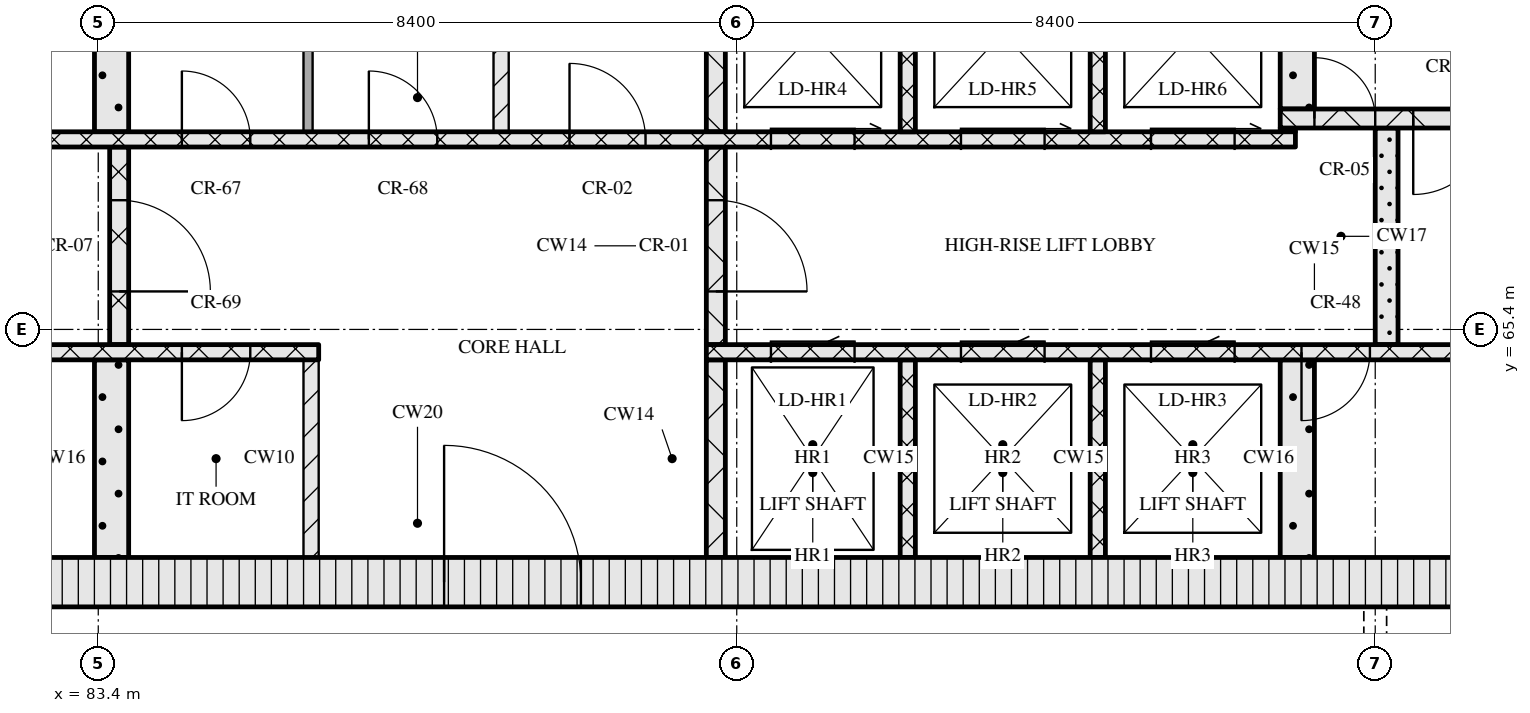
"""IFC4 building model, lengths in metres.
Left out: names, types, materials, properties, quantities, classifications, styles, units other than length and angle.
Written with IfcOpenShell. Run it as: python <this file> out.ifc"""

import sys

from ifc_helpers import new_model, si_unit, direction, frame, frame_2d, origin, place, context, subcontext, project, spatial, rectangle, extrude, element, fill, save


model = new_model("IFC4")
c1 = context("Model", 3, precision=1e-05, world=origin(), true_north=direction((0.0, 1.0)))
c2 = subcontext(c1, "Body", "Model", "MODEL_VIEW")
j1 = project(units=[si_unit("LENGTHUNIT", "METRE"), si_unit("PLANEANGLEUNIT", "RADIAN")], contexts=[c1])
p1 = place(None, origin())
s1 = spatial("IfcSite", under=j1, at=p1, CompositionType="ELEMENT")
p2 = place(p1, origin())
s2 = spatial("IfcBuilding", under=s1, at=p2, CompositionType="ELEMENT")
p3 = place(p2, frame((0.0, 0.0, 209.1)))
s3 = spatial("IfcBuildingStorey", under=s2, at=p3, CompositionType="ELEMENT", Elevation=209.1)
p4 = place(p3, frame((67.15, 62.075, 0.0), z_axis=(0.0, 0.0, 1.0), x_axis=(1.0, 0.0, 0.0)))
e1 = element("IfcWall", 1, at=p4, inside=s3, PredefinedType="SOLIDWALL", context=c2, shape_type="SweptSolid", body=[
    extrude(rectangle(XDim=40.9, YDim=0.65, at=frame_2d((20.45, 0.0))), origin(), (0.0, 0.0, 1.0), 3.32),
])
p5 = place(p4, frame((20.8, 0.0, 0.0)))
e2 = element("IfcOpeningElement", 2, at=p5, cuts=e1, PredefinedType="OPENING", context=c2, shape_type="SweptSolid", body=[
    extrude(rectangle(XDim=1.8, YDim=2.1, at=frame_2d((0.9, 1.05))), frame((0.0, 0.335, 0.0), z_axis=(0.0, -1.0, 0.0), x_axis=(1.0, 0.0, 0.0)), (0.0, 0.0, 1.0), 0.67),
])
p6 = place(p3, frame((83.575, 62.4, 0.0), z_axis=(0.0, 0.0, 1.0), x_axis=(0.0, 1.0, 0.0)))
e3 = element("IfcWall", 3, at=p6, inside=s3, PredefinedType="SOLIDWALL", context=c2, shape_type="SweptSolid", body=[
    extrude(rectangle(XDim=2.6, YDim=0.45, at=frame_2d((1.3, 0.0))), origin(), (0.0, 0.0, 1.0), 3.32),
])
p7 = place(p3, frame((86.2, 62.4, 0.0), z_axis=(0.0, 0.0, 1.0), x_axis=(0.0, 1.0, 0.0)))
e4 = element("IfcWall", 4, at=p7, inside=s3, PredefinedType="PARTITIONING", context=c2, shape_type="SweptSolid", body=[
    extrude(rectangle(XDim=2.6, YDim=0.2, at=frame_2d((1.3, 0.0))), origin(), (0.0, 0.0, 1.0), 3.32),
])
p8 = place(p3, frame((91.525, 62.4, 0.0), z_axis=(0.0, 0.0, 1.0), x_axis=(0.0, 1.0, 0.0)))
e5 = element("IfcWall", 5, at=p8, inside=s3, PredefinedType="SOLIDWALL", context=c2, shape_type="SweptSolid", body=[
    extrude(rectangle(XDim=2.6, YDim=0.25, at=frame_2d((1.3, 0.0))), origin(), (0.0, 0.0, 1.0), 3.32),
])
for number, where, z_axis, x_axis in (
    (6, (94.05, 62.4, 0.0), (0.0, 0.0, 1.0), (0.0, 1.0, 0.0)),
    (7, (96.55, 62.4, 0.0), (0.0, 0.0, 1.0), (0.0, 1.0, 0.0)),
):
    element("IfcWall", number, at=place(p3, frame(where, z_axis=z_axis, x_axis=x_axis)), inside=s3, PredefinedType="SOLIDWALL", context=c2, shape_type="SweptSolid", body=[
        extrude(rectangle(XDim=2.6, YDim=0.2, at=frame_2d((1.3, 0.0))), origin(), (0.0, 0.0, 1.0), 3.32),
    ])
p9 = place(p3, frame((99.175, 62.4, 0.0), z_axis=(0.0, 0.0, 1.0), x_axis=(0.0, 1.0, 0.0)))
e8 = element("IfcWall", 8, at=p9, inside=s3, PredefinedType="SOLIDWALL", context=c2, shape_type="SweptSolid", body=[
    extrude(rectangle(XDim=2.6, YDim=0.45, at=frame_2d((1.3, 0.0))), origin(), (0.0, 0.0, 1.0), 3.32),
])
p10 = place(p3, frame((67.8, 65.1, 0.0), z_axis=(0.0, 0.0, 1.0), x_axis=(1.0, 0.0, 0.0)))
e9 = element("IfcWall", 9, at=p10, inside=s3, PredefinedType="SOLIDWALL", context=c2, shape_type="SweptSolid", body=[
    extrude(rectangle(XDim=18.5, YDim=0.2, at=frame_2d((9.25, 0.0))), origin(), (0.0, 0.0, 1.0), 3.32),
])
p11 = place(p10, frame((7.27, 0.0, 0.0)))
e10 = element("IfcOpeningElement", 10, at=p11, cuts=e9, PredefinedType="OPENING", context=c2, shape_type="SweptSolid", body=[
    extrude(rectangle(XDim=0.9, YDim=2.1, at=frame_2d((0.45, 1.05))), frame((0.0, 0.11, 0.0), z_axis=(0.0, -1.0, 0.0), x_axis=(1.0, 0.0, 0.0)), (0.0, 0.0, 1.0), 0.22),
])
p12 = place(p10, frame((11.45, 0.0, 0.0)))
e11 = element("IfcOpeningElement", 11, at=p12, cuts=e9, PredefinedType="OPENING", context=c2, shape_type="SweptSolid", body=[
    extrude(rectangle(XDim=0.9, YDim=2.1, at=frame_2d((0.45, 1.05))), frame((0.0, 0.11, 0.0), z_axis=(0.0, -1.0, 0.0), x_axis=(1.0, 0.0, 0.0)), (0.0, 0.0, 1.0), 0.22),
])
p13 = place(p10, frame((16.7, 0.0, 0.0)))
e12 = element("IfcOpeningElement", 12, at=p13, cuts=e9, PredefinedType="OPENING", context=c2, shape_type="SweptSolid", body=[
    extrude(rectangle(XDim=0.9, YDim=2.1, at=frame_2d((0.45, 1.05))), frame((0.0, 0.11, 0.0), z_axis=(0.0, -1.0, 0.0), x_axis=(1.0, 0.0, 0.0)), (0.0, 0.0, 1.0), 0.22),
])
p14 = place(p3, frame((91.4, 65.1, 0.0), z_axis=(0.0, 0.0, 1.0), x_axis=(1.0, 0.0, 0.0)))
e13 = element("IfcWall", 13, at=p14, inside=s3, PredefinedType="SOLIDWALL", context=c2, shape_type="SweptSolid", body=[
    extrude(rectangle(XDim=16.0, YDim=0.2, at=frame_2d((8.0, 0.0))), origin(), (0.0, 0.0, 1.0), 3.32),
])
p15 = place(p14, frame((0.85, 0.0, 0.0)))
e14 = element("IfcOpeningElement", 14, at=p15, cuts=e13, PredefinedType="OPENING", context=c2, shape_type="SweptSolid", body=[
    extrude(rectangle(XDim=1.1, YDim=2.1, at=frame_2d((0.55, 1.05))), frame((0.0, 0.11, 0.0), z_axis=(0.0, -1.0, 0.0), x_axis=(1.0, 0.0, 0.0)), (0.0, 0.0, 1.0), 0.22),
])
p16 = place(p14, frame((3.35, 0.0, 0.0)))
e15 = element("IfcOpeningElement", 15, at=p16, cuts=e13, PredefinedType="OPENING", context=c2, shape_type="SweptSolid", body=[
    extrude(rectangle(XDim=1.1, YDim=2.1, at=frame_2d((0.55, 1.05))), frame((0.0, 0.11, 0.0), z_axis=(0.0, -1.0, 0.0), x_axis=(1.0, 0.0, 0.0)), (0.0, 0.0, 1.0), 0.22),
])
p17 = place(p14, frame((5.85, 0.0, 0.0)))
e16 = element("IfcOpeningElement", 16, at=p17, cuts=e13, PredefinedType="OPENING", context=c2, shape_type="SweptSolid", body=[
    extrude(rectangle(XDim=1.1, YDim=2.1, at=frame_2d((0.55, 1.05))), frame((0.0, 0.11, 0.0), z_axis=(0.0, -1.0, 0.0), x_axis=(1.0, 0.0, 0.0)), (0.0, 0.0, 1.0), 0.22),
])
p18 = place(p14, frame((7.83, 0.0, 0.0)))
e17 = element("IfcOpeningElement", 17, at=p18, cuts=e13, PredefinedType="OPENING", context=c2, shape_type="SweptSolid", body=[
    extrude(rectangle(XDim=0.9, YDim=2.1, at=frame_2d((0.45, 1.05))), frame((0.0, 0.11, 0.0), z_axis=(0.0, -1.0, 0.0), x_axis=(1.0, 0.0, 0.0)), (0.0, 0.0, 1.0), 0.22),
])
p19 = place(p3, frame((83.675, 65.2, 0.0), z_axis=(0.0, 0.0, 1.0), x_axis=(0.0, 1.0, 0.0)))
e18 = element("IfcWall", 18, at=p19, inside=s3, PredefinedType="SOLIDWALL", context=c2, shape_type="SweptSolid", body=[
    extrude(rectangle(XDim=2.6, YDim=0.25, at=frame_2d((1.3, 0.0))), origin(), (0.0, 0.0, 1.0), 3.32),
])
p20 = place(p19, frame((0.7, 0.0, 0.0)))
e19 = element("IfcOpeningElement", 19, at=p20, cuts=e18, PredefinedType="OPENING", context=c2, shape_type="SweptSolid", body=[
    extrude(rectangle(XDim=1.2, YDim=2.1, at=frame_2d((0.6, 1.05))), frame((0.0, 0.135, 0.0), z_axis=(0.0, -1.0, 0.0), x_axis=(1.0, 0.0, 0.0)), (0.0, 0.0, 1.0), 0.27),
])
p21 = place(p3, frame((91.525, 65.2, 0.0), z_axis=(0.0, 0.0, 1.0), x_axis=(0.0, 1.0, 0.0)))
e20 = element("IfcWall", 20, at=p21, inside=s3, PredefinedType="SOLIDWALL", context=c2, shape_type="SweptSolid", body=[
    extrude(rectangle(XDim=2.6, YDim=0.25, at=frame_2d((1.3, 0.0))), origin(), (0.0, 0.0, 1.0), 3.32),
])
p22 = place(p21, frame((0.7, 0.0, 0.0)))
e21 = element("IfcOpeningElement", 21, at=p22, cuts=e20, PredefinedType="OPENING", context=c2, shape_type="SweptSolid", body=[
    extrude(rectangle(XDim=1.2, YDim=2.1, at=frame_2d((0.6, 1.05))), frame((0.0, 0.135, 0.0), z_axis=(0.0, -1.0, 0.0), x_axis=(1.0, 0.0, 0.0)), (0.0, 0.0, 1.0), 0.27),
])
p23 = place(p3, frame((100.35, 65.2, 0.0), z_axis=(0.0, 0.0, 1.0), x_axis=(0.0, 1.0, 0.0)))
e22 = element("IfcWall", 22, at=p23, inside=s3, PredefinedType="SOLIDWALL", context=c2, shape_type="SweptSolid", body=[
    extrude(rectangle(XDim=2.85, YDim=0.3, at=frame_2d((1.425, 0.0))), origin(), (0.0, 0.0, 1.0), 3.32),
])
p24 = place(p3, frame((76.05, 67.9, 0.0), z_axis=(0.0, 0.0, 1.0), x_axis=(1.0, 0.0, 0.0)))
e23 = element("IfcWall", 23, at=p24, inside=s3, PredefinedType="SOLIDWALL", context=c2, shape_type="SweptSolid", body=[
    extrude(rectangle(XDim=23.1, YDim=0.2, at=frame_2d((11.55, 0.0))), origin(), (0.0, 0.0, 1.0), 3.32),
])
p25 = place(p24, frame((1.4, 0.0, 0.0)))
e24 = element("IfcOpeningElement", 24, at=p25, cuts=e23, PredefinedType="OPENING", context=c2, shape_type="SweptSolid", body=[
    extrude(rectangle(XDim=0.9, YDim=2.1, at=frame_2d((0.45, 1.05))), frame((0.0, 0.11, 0.0), z_axis=(0.0, -1.0, 0.0), x_axis=(1.0, 0.0, 0.0)), (0.0, 0.0, 1.0), 0.22),
])
p26 = place(p24, frame((5.11, 0.0, 0.0)))
e25 = element("IfcOpeningElement", 25, at=p26, cuts=e23, PredefinedType="OPENING", context=c2, shape_type="SweptSolid", body=[
    extrude(rectangle(XDim=0.9, YDim=2.1, at=frame_2d((0.45, 1.05))), frame((0.0, 0.11, 0.0), z_axis=(0.0, -1.0, 0.0), x_axis=(1.0, 0.0, 0.0)), (0.0, 0.0, 1.0), 0.22),
])
p27 = place(p24, frame((8.45, 0.0, 0.0)))
e26 = element("IfcOpeningElement", 26, at=p27, cuts=e23, PredefinedType="OPENING", context=c2, shape_type="SweptSolid", body=[
    extrude(rectangle(XDim=0.9, YDim=2.1, at=frame_2d((0.45, 1.05))), frame((0.0, 0.11, 0.0), z_axis=(0.0, -1.0, 0.0), x_axis=(1.0, 0.0, 0.0)), (0.0, 0.0, 1.0), 0.22),
])
p28 = place(p24, frame((10.91, 0.0, 0.0)))
e27 = element("IfcOpeningElement", 27, at=p28, cuts=e23, PredefinedType="OPENING", context=c2, shape_type="SweptSolid", body=[
    extrude(rectangle(XDim=0.9, YDim=2.1, at=frame_2d((0.45, 1.05))), frame((0.0, 0.11, 0.0), z_axis=(0.0, -1.0, 0.0), x_axis=(1.0, 0.0, 0.0)), (0.0, 0.0, 1.0), 0.22),
])
p29 = place(p24, frame((13.55, 0.0, 0.0)))
e28 = element("IfcOpeningElement", 28, at=p29, cuts=e23, PredefinedType="OPENING", context=c2, shape_type="SweptSolid", body=[
    extrude(rectangle(XDim=1.0, YDim=2.1, at=frame_2d((0.5, 1.05))), frame((0.0, 0.11, 0.0), z_axis=(0.0, -1.0, 0.0), x_axis=(1.0, 0.0, 0.0)), (0.0, 0.0, 1.0), 0.22),
])
p30 = place(p24, frame((16.2, 0.0, 0.0)))
e29 = element("IfcOpeningElement", 29, at=p30, cuts=e23, PredefinedType="OPENING", context=c2, shape_type="SweptSolid", body=[
    extrude(rectangle(XDim=1.1, YDim=2.1, at=frame_2d((0.55, 1.05))), frame((0.0, 0.11, 0.0), z_axis=(0.0, -1.0, 0.0), x_axis=(1.0, 0.0, 0.0)), (0.0, 0.0, 1.0), 0.22),
])
p31 = place(p24, frame((18.7, 0.0, 0.0)))
e30 = element("IfcOpeningElement", 30, at=p31, cuts=e23, PredefinedType="OPENING", context=c2, shape_type="SweptSolid", body=[
    extrude(rectangle(XDim=1.1, YDim=2.1, at=frame_2d((0.55, 1.05))), frame((0.0, 0.11, 0.0), z_axis=(0.0, -1.0, 0.0), x_axis=(1.0, 0.0, 0.0)), (0.0, 0.0, 1.0), 0.22),
])
p32 = place(p24, frame((21.2, 0.0, 0.0)))
e31 = element("IfcOpeningElement", 31, at=p32, cuts=e23, PredefinedType="OPENING", context=c2, shape_type="SweptSolid", body=[
    extrude(rectangle(XDim=1.1, YDim=2.1, at=frame_2d((0.55, 1.05))), frame((0.0, 0.11, 0.0), z_axis=(0.0, -1.0, 0.0), x_axis=(1.0, 0.0, 0.0)), (0.0, 0.0, 1.0), 0.22),
])
p33 = place(p3, frame((83.575, 68.0, 0.0), z_axis=(0.0, 0.0, 1.0), x_axis=(0.0, 1.0, 0.0)))
e32 = element("IfcWall", 32, at=p33, inside=s3, PredefinedType="SOLIDWALL", context=c2, shape_type="SweptSolid", body=[
    extrude(rectangle(XDim=2.6, YDim=0.45, at=frame_2d((1.3, 0.0))), origin(), (0.0, 0.0, 1.0), 3.32),
])
p34 = place(p3, frame((86.16, 68.0, 0.0), z_axis=(0.0, 0.0, 1.0), x_axis=(0.0, 1.0, 0.0)))
e33 = element("IfcWall", 33, at=p34, inside=s3, PredefinedType="PARTITIONING", context=c2, shape_type="SweptSolid", body=[
    extrude(rectangle(XDim=2.6, YDim=0.12, at=frame_2d((1.3, 0.0))), origin(), (0.0, 0.0, 1.0), 3.32),
])
p35 = place(p3, frame((88.7, 68.0, 0.0), z_axis=(0.0, 0.0, 1.0), x_axis=(0.0, 1.0, 0.0)))
e34 = element("IfcWall", 34, at=p35, inside=s3, PredefinedType="PARTITIONING", context=c2, shape_type="SweptSolid", body=[
    extrude(rectangle(XDim=2.6, YDim=0.2, at=frame_2d((1.3, 0.0))), origin(), (0.0, 0.0, 1.0), 3.32),
])
p36 = place(p3, frame((91.525, 68.0, 0.0), z_axis=(0.0, 0.0, 1.0), x_axis=(0.0, 1.0, 0.0)))
e35 = element("IfcWall", 35, at=p36, inside=s3, PredefinedType="SOLIDWALL", context=c2, shape_type="SweptSolid", body=[
    extrude(rectangle(XDim=2.6, YDim=0.25, at=frame_2d((1.3, 0.0))), origin(), (0.0, 0.0, 1.0), 3.32),
])
for number, where, z_axis, x_axis in (
    (36, (94.05, 68.0, 0.0), (0.0, 0.0, 1.0), (0.0, 1.0, 0.0)),
    (37, (96.55, 68.0, 0.0), (0.0, 0.0, 1.0), (0.0, 1.0, 0.0)),
):
    element("IfcWall", number, at=place(p3, frame(where, z_axis=z_axis, x_axis=x_axis)), inside=s3, PredefinedType="SOLIDWALL", context=c2, shape_type="SweptSolid", body=[
        extrude(rectangle(XDim=2.6, YDim=0.2, at=frame_2d((1.3, 0.0))), origin(), (0.0, 0.0, 1.0), 3.32),
    ])
p37 = place(p3, frame((98.95, 68.025, 0.0), z_axis=(0.0, 0.0, 1.0), x_axis=(1.0, 0.0, 0.0)))
e38 = element("IfcWall", 38, at=p37, inside=s3, PredefinedType="SOLIDWALL", context=c2, shape_type="SweptSolid", body=[
    extrude(rectangle(XDim=0.2, YDim=0.05, at=frame_2d((0.1, 0.0))), origin(), (0.0, 0.0, 1.0), 3.32),
])
p38 = place(p3, frame((98.95, 68.175, 0.0), z_axis=(0.0, 0.0, 1.0), x_axis=(1.0, 0.0, 0.0)))
e39 = element("IfcWall", 39, at=p38, inside=s3, PredefinedType="SOLIDWALL", context=c2, shape_type="SweptSolid", body=[
    extrude(rectangle(XDim=8.45, YDim=0.25, at=frame_2d((4.225, 0.0))), origin(), (0.0, 0.0, 1.0), 3.32),
])
p39 = place(p38, frame((0.45, 0.0, 0.0)))
e40 = element("IfcOpeningElement", 40, at=p39, cuts=e39, PredefinedType="OPENING", context=c2, shape_type="SweptSolid", body=[
    extrude(rectangle(XDim=0.8, YDim=2.1, at=frame_2d((0.4, 1.05))), frame((0.0, 0.135, 0.0), z_axis=(0.0, -1.0, 0.0), x_axis=(1.0, 0.0, 0.0)), (0.0, 0.0, 1.0), 0.27),
])
p40 = place(p38, frame((1.75, 0.0, 0.0)))
e41 = element("IfcOpeningElement", 41, at=p40, cuts=e39, PredefinedType="OPENING", context=c2, shape_type="SweptSolid", body=[
    extrude(rectangle(XDim=1.0, YDim=2.1, at=frame_2d((0.5, 1.05))), frame((0.0, 0.135, 0.0), z_axis=(0.0, -1.0, 0.0), x_axis=(1.0, 0.0, 0.0)), (0.0, 0.0, 1.0), 0.27),
])
p41 = place(p3, frame((99.175, 68.3, 0.0), z_axis=(0.0, 0.0, 1.0), x_axis=(0.0, 1.0, 0.0)))
e42 = element("IfcWall", 42, at=p41, inside=s3, PredefinedType="SOLIDWALL", context=c2, shape_type="SweptSolid", body=[
    extrude(rectangle(XDim=2.3, YDim=0.45, at=frame_2d((1.15, 0.0))), origin(), (0.0, 0.0, 1.0), 3.32),
])
p42 = place(p5, origin())
e43 = element("IfcDoor", 43, at=p42, inside=s3, OperationType="DOUBLE_DOOR_SINGLE_SWING", PredefinedType="DOOR", context=c2, shape_type="SweptSolid", body=[
    extrude(rectangle(XDim=1.8, YDim=2.1, at=frame_2d((0.9, 1.05))), frame((0.0, 0.025, 0.0), z_axis=(0.0, -1.0, 0.0), x_axis=(1.0, 0.0, 0.0)), (0.0, 0.0, 1.0), 0.05),
])
fill(e2, e43)
p43 = place(p13, origin())
e44 = element("IfcDoor", 44, at=p43, inside=s3, OperationType="SINGLE_SWING_RIGHT", PredefinedType="DOOR", context=c2, shape_type="SweptSolid", body=[
    extrude(rectangle(XDim=0.9, YDim=2.1, at=frame_2d((0.45, 1.05))), frame((0.0, 0.025, 0.0), z_axis=(0.0, -1.0, 0.0), x_axis=(1.0, 0.0, 0.0)), (0.0, 0.0, 1.0), 0.05),
])
fill(e12, e44)
p44 = place(p15, origin())
e45 = element("IfcDoor", 45, at=p44, inside=s3, OperationType="SLIDING_TO_LEFT", PredefinedType="DOOR", context=c2, shape_type="SweptSolid", body=[
    extrude(rectangle(XDim=1.1, YDim=2.1, at=frame_2d((0.55, 1.05))), frame((0.0, 0.025, 0.0), z_axis=(0.0, -1.0, 0.0), x_axis=(1.0, 0.0, 0.0)), (0.0, 0.0, 1.0), 0.05),
])
fill(e14, e45)
p45 = place(p16, origin())
e46 = element("IfcDoor", 46, at=p45, inside=s3, OperationType="SLIDING_TO_LEFT", PredefinedType="DOOR", context=c2, shape_type="SweptSolid", body=[
    extrude(rectangle(XDim=1.1, YDim=2.1, at=frame_2d((0.55, 1.05))), frame((0.0, 0.025, 0.0), z_axis=(0.0, -1.0, 0.0), x_axis=(1.0, 0.0, 0.0)), (0.0, 0.0, 1.0), 0.05),
])
fill(e15, e46)
p46 = place(p17, origin())
e47 = element("IfcDoor", 47, at=p46, inside=s3, OperationType="SLIDING_TO_LEFT", PredefinedType="DOOR", context=c2, shape_type="SweptSolid", body=[
    extrude(rectangle(XDim=1.1, YDim=2.1, at=frame_2d((0.55, 1.05))), frame((0.0, 0.025, 0.0), z_axis=(0.0, -1.0, 0.0), x_axis=(1.0, 0.0, 0.0)), (0.0, 0.0, 1.0), 0.05),
])
fill(e16, e47)
p47 = place(p18, origin())
e48 = element("IfcDoor", 48, at=p47, inside=s3, OperationType="SINGLE_SWING_RIGHT", PredefinedType="DOOR", context=c2, shape_type="SweptSolid", body=[
    extrude(rectangle(XDim=0.9, YDim=2.1, at=frame_2d((0.45, 1.05))), frame((0.0, 0.025, 0.0), z_axis=(0.0, -1.0, 0.0), x_axis=(1.0, 0.0, 0.0)), (0.0, 0.0, 1.0), 0.05),
])
fill(e17, e48)
p48 = place(p20, origin())
e49 = element("IfcDoor", 49, at=p48, inside=s3, OperationType="SINGLE_SWING_RIGHT", PredefinedType="DOOR", context=c2, shape_type="SweptSolid", body=[
    extrude(rectangle(XDim=1.2, YDim=2.1, at=frame_2d((0.6, 1.05))), frame((0.0, 0.025, 0.0), z_axis=(0.0, -1.0, 0.0), x_axis=(1.0, 0.0, 0.0)), (0.0, 0.0, 1.0), 0.05),
])
fill(e19, e49)
p49 = place(p22, origin())
e50 = element("IfcDoor", 50, at=p49, inside=s3, OperationType="SINGLE_SWING_RIGHT", PredefinedType="DOOR", context=c2, shape_type="SweptSolid", body=[
    extrude(rectangle(XDim=1.2, YDim=2.1, at=frame_2d((0.6, 1.05))), frame((0.0, 0.025, 0.0), z_axis=(0.0, -1.0, 0.0), x_axis=(1.0, 0.0, 0.0)), (0.0, 0.0, 1.0), 0.05),
])
fill(e21, e50)
p50 = place(p27, origin())
e51 = element("IfcDoor", 51, at=p50, inside=s3, OperationType="SINGLE_SWING_LEFT", PredefinedType="DOOR", context=c2, shape_type="SweptSolid", body=[
    extrude(rectangle(XDim=0.9, YDim=2.1, at=frame_2d((0.45, 1.05))), frame((0.0, 0.025, 0.0), z_axis=(0.0, -1.0, 0.0), x_axis=(1.0, 0.0, 0.0)), (0.0, 0.0, 1.0), 0.05),
])
fill(e26, e51)
p51 = place(p28, origin())
e52 = element("IfcDoor", 52, at=p51, inside=s3, OperationType="SINGLE_SWING_LEFT", PredefinedType="DOOR", context=c2, shape_type="SweptSolid", body=[
    extrude(rectangle(XDim=0.9, YDim=2.1, at=frame_2d((0.45, 1.05))), frame((0.0, 0.025, 0.0), z_axis=(0.0, -1.0, 0.0), x_axis=(1.0, 0.0, 0.0)), (0.0, 0.0, 1.0), 0.05),
])
fill(e27, e52)
p52 = place(p29, origin())
e53 = element("IfcDoor", 53, at=p52, inside=s3, OperationType="SINGLE_SWING_LEFT", PredefinedType="DOOR", context=c2, shape_type="SweptSolid", body=[
    extrude(rectangle(XDim=1.0, YDim=2.1, at=frame_2d((0.5, 1.05))), frame((0.0, 0.025, 0.0), z_axis=(0.0, -1.0, 0.0), x_axis=(1.0, 0.0, 0.0)), (0.0, 0.0, 1.0), 0.05),
])
fill(e28, e53)
p53 = place(p30, origin())
e54 = element("IfcDoor", 54, at=p53, inside=s3, OperationType="SLIDING_TO_RIGHT", PredefinedType="DOOR", context=c2, shape_type="SweptSolid", body=[
    extrude(rectangle(XDim=1.1, YDim=2.1, at=frame_2d((0.55, 1.05))), frame((0.0, 0.025, 0.0), z_axis=(0.0, -1.0, 0.0), x_axis=(1.0, 0.0, 0.0)), (0.0, 0.0, 1.0), 0.05),
])
fill(e29, e54)
p54 = place(p31, origin())
e55 = element("IfcDoor", 55, at=p54, inside=s3, OperationType="SLIDING_TO_RIGHT", PredefinedType="DOOR", context=c2, shape_type="SweptSolid", body=[
    extrude(rectangle(XDim=1.1, YDim=2.1, at=frame_2d((0.55, 1.05))), frame((0.0, 0.025, 0.0), z_axis=(0.0, -1.0, 0.0), x_axis=(1.0, 0.0, 0.0)), (0.0, 0.0, 1.0), 0.05),
])
fill(e30, e55)
p55 = place(p32, origin())
e56 = element("IfcDoor", 56, at=p55, inside=s3, OperationType="SLIDING_TO_RIGHT", PredefinedType="DOOR", context=c2, shape_type="SweptSolid", body=[
    extrude(rectangle(XDim=1.1, YDim=2.1, at=frame_2d((0.55, 1.05))), frame((0.0, 0.025, 0.0), z_axis=(0.0, -1.0, 0.0), x_axis=(1.0, 0.0, 0.0)), (0.0, 0.0, 1.0), 0.05),
])
fill(e31, e56)
p56 = place(p39, origin())
e57 = element("IfcDoor", 57, at=p56, inside=s3, OperationType="SINGLE_SWING_LEFT", PredefinedType="DOOR", context=c2, shape_type="SweptSolid", body=[
    extrude(rectangle(XDim=0.8, YDim=2.1, at=frame_2d((0.4, 1.05))), frame((0.0, 0.025, 0.0), z_axis=(0.0, -1.0, 0.0), x_axis=(1.0, 0.0, 0.0)), (0.0, 0.0, 1.0), 0.05),
])
fill(e40, e57)
p57 = place(p40, origin())
e58 = element("IfcDoor", 58, at=p57, inside=s3, OperationType="SINGLE_SWING_RIGHT", PredefinedType="DOOR", context=c2, shape_type="SweptSolid", body=[
    extrude(rectangle(XDim=1.0, YDim=2.1, at=frame_2d((0.5, 1.05))), frame((0.0, 0.025, 0.0), z_axis=(0.0, -1.0, 0.0), x_axis=(1.0, 0.0, 0.0)), (0.0, 0.0, 1.0), 0.05),
])
fill(e41, e58)
save(model, sys.argv[1])
